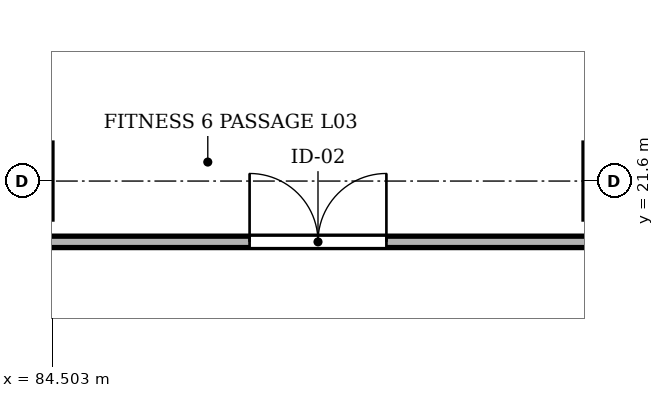
"""IFC4 building model, lengths in metres.
Left out: names, types, materials, properties, quantities, classifications, styles, units other than length and angle.
Written with IfcOpenShell. Run it as: python <this file> out.ifc"""

import sys

from ifc_helpers import new_model, si_unit, direction, frame, frame_2d, origin, place, context, subcontext, project, spatial, rectangle, extrude, element, fill, save


model = new_model("IFC4")
c1 = context("Model", 3, precision=1e-05, world=origin(), true_north=direction((0.0, 1.0)))
c2 = subcontext(c1, "Body", "Model", "MODEL_VIEW")
j1 = project(units=[si_unit("LENGTHUNIT", "METRE"), si_unit("PLANEANGLEUNIT", "RADIAN")], contexts=[c1])
p1 = place(None, origin())
s1 = spatial("IfcSite", under=j1, at=p1, CompositionType="ELEMENT")
p2 = place(p1, origin())
s2 = spatial("IfcBuilding", under=s1, at=p2, CompositionType="ELEMENT")
p3 = place(p2, frame((0.0, 0.0, 14.0)))
s3 = spatial("IfcBuildingStorey", under=s2, at=p3, CompositionType="ELEMENT", Elevation=14.0)
p4 = place(p3, frame((76.8, 20.8, 0.0), z_axis=(0.0, 0.0, 1.0), x_axis=(1.0, 0.0, 0.0)))
e1 = element("IfcWall", 1, at=p4, inside=s3, PredefinedType="PARTITIONING", context=c2, shape_type="SweptSolid", body=[
    extrude(rectangle(XDim=30.4, YDim=0.15, at=frame_2d((15.2, 0.0))), origin(), (0.0, 0.0, 1.0), 9.43),
])
p5 = place(p4, frame((10.3, 0.0, 0.0)))
e2 = element("IfcOpeningElement", 2, at=p5, cuts=e1, PredefinedType="OPENING", context=c2, shape_type="SweptSolid", body=[
    extrude(rectangle(XDim=1.8, YDim=2.25, at=frame_2d((0.9, 1.125))), frame((0.0, 0.087, 0.0), z_axis=(0.0, -1.0, 0.0), x_axis=(1.0, 0.0, 0.0)), (0.0, 0.0, 1.0), 0.174),
])
p6 = place(p5, origin())
e3 = element("IfcDoor", 3, at=p6, inside=s3, OperationType="DOUBLE_DOOR_SINGLE_SWING", PredefinedType="DOOR", context=c2, shape_type="SweptSolid", body=[
    extrude(rectangle(XDim=1.8, YDim=2.25, at=frame_2d((0.9, 1.125))), frame((0.0, 0.025, 0.0), z_axis=(0.0, -1.0, 0.0), x_axis=(1.0, 0.0, 0.0)), (0.0, 0.0, 1.0), 0.05),
])
fill(e2, e3)
save(model, sys.argv[1])
